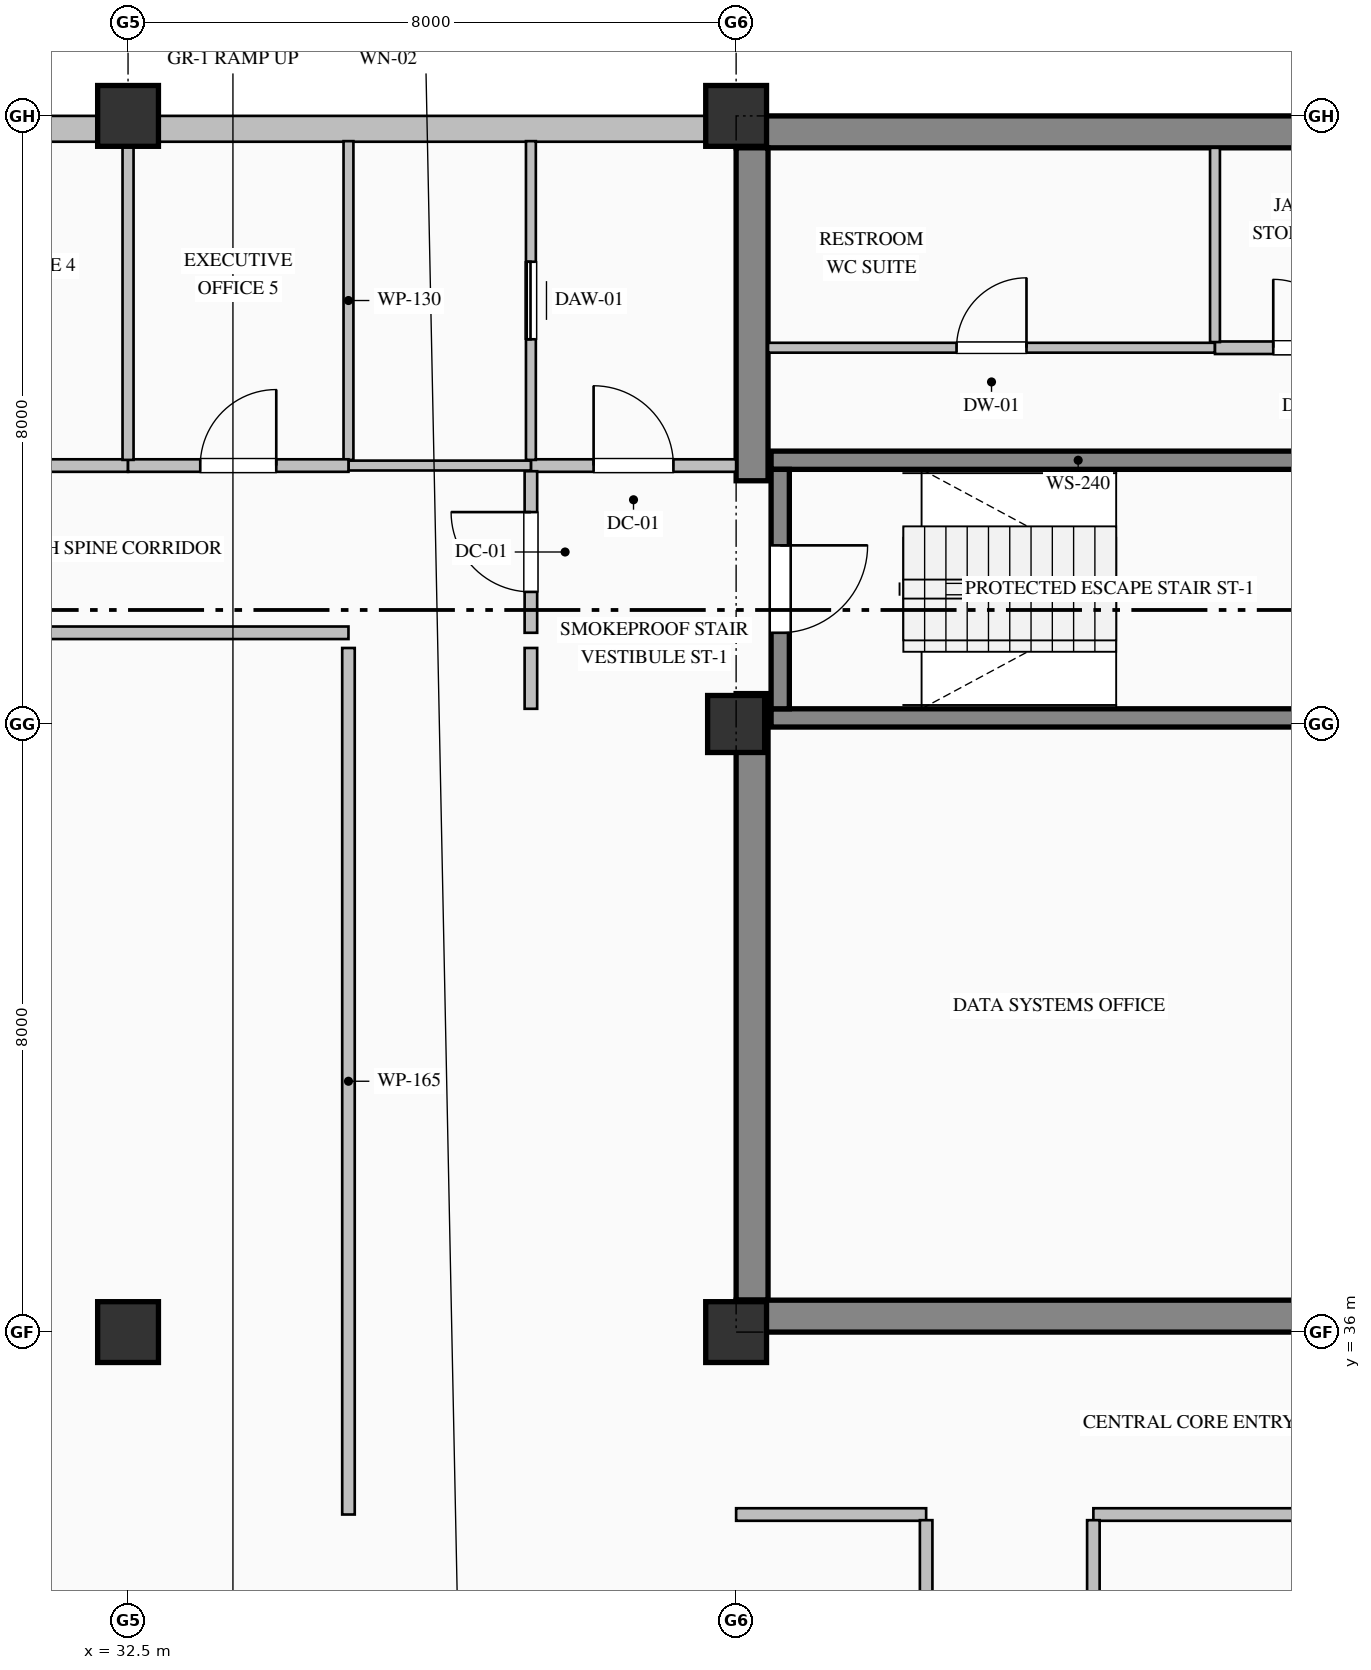
"""IFC4 building model, lengths in metres.
Left out: names, types, materials, properties, quantities, classifications, styles, units other than length and angle.
Written with IfcOpenShell. Run it as: python <this file> out.ifc"""

import sys

from ifc_helpers import new_model, si_unit, direction, frame, frame_2d, origin, origin_2d, place, context, subcontext, project, spatial, rectangle, hollow_rectangle, extrude, element, fill, save


model = new_model("IFC4")
c1 = context("Model", 3, precision=1e-05, world=origin(), true_north=direction((0.0, 1.0)))
c2 = subcontext(c1, "Body", "Model", "MODEL_VIEW")
j1 = project(units=[si_unit("LENGTHUNIT", "METRE"), si_unit("PLANEANGLEUNIT", "RADIAN")], contexts=[c1])
p1 = place(None, origin())
s1 = spatial("IfcSite", under=j1, at=p1, CompositionType="ELEMENT")
p2 = place(p1, origin())
s2 = spatial("IfcBuilding", under=s1, at=p2, CompositionType="ELEMENT")
p3 = place(p2, frame((0.0, 0.0, 291.2)))
s3 = spatial("IfcBuildingStorey", under=s2, at=p3, CompositionType="ELEMENT", Elevation=291.2)
p4 = place(p3, frame((40.5, 51.79, 0.0), z_axis=(0.0, 0.0, 1.0), x_axis=(1.0, 0.0, 0.0)))
e1 = element("IfcWall", 1, at=p4, inside=s3, PredefinedType="SHEAR", context=c2, shape_type="SweptSolid", body=[
    extrude(rectangle(XDim=23.5, YDim=0.42, at=frame_2d((11.75, 0.0))), origin(), (0.0, 0.0, 1.0), 3.785),
])
p5 = place(p3, frame((40.71, 36.42, 0.0), z_axis=(0.0, 0.0, 1.0), x_axis=(0.0, 1.0, 0.0)))
e2 = element("IfcWall", 2, at=p5, inside=s3, PredefinedType="SHEAR", context=c2, shape_type="SweptSolid", body=[
    extrude(rectangle(XDim=7.98, YDim=0.42, at=frame_2d((3.99, 0.0))), origin(), (0.0, 0.0, 1.0), 3.785),
])
p6 = place(p3, frame((40.71, 47.2, 0.0), z_axis=(0.0, 0.0, 1.0), x_axis=(0.0, 1.0, 0.0)))
e3 = element("IfcWall", 3, at=p6, inside=s3, PredefinedType="SHEAR", context=c2, shape_type="SweptSolid", body=[
    extrude(rectangle(XDim=4.38, YDim=0.42, at=frame_2d((2.19, 0.0))), origin(), (0.0, 0.0, 1.0), 3.785),
])
p7 = place(p3, frame((40.5, 36.21, 0.0), z_axis=(0.0, 0.0, 1.0), x_axis=(1.0, 0.0, 0.0)))
e4 = element("IfcWall", 4, at=p7, inside=s3, PredefinedType="SHEAR", context=c2, shape_type="SweptSolid", body=[
    extrude(rectangle(XDim=9.1, YDim=0.42, at=frame_2d((4.55, 0.0))), origin(), (0.0, 0.0, 1.0), 3.785),
])
for number, where, z_axis, x_axis in (
    (5, (32.5, 36.0, 0.0), (0.0, 0.0, 1.0), (1.0, 0.0, 0.0)),
    (6, (32.5, 52.0, 0.0), (0.0, 0.0, 1.0), (1.0, 0.0, 0.0)),
    (7, (40.5, 36.0, 0.0), (0.0, 0.0, 1.0), (1.0, 0.0, 0.0)),
):
    element("IfcColumn", number, at=place(p3, frame(where, z_axis=z_axis, x_axis=x_axis)), inside=s3, PredefinedType="COLUMN", context=c2, shape_type="SweptSolid", body=[
        extrude(hollow_rectangle(XDim=0.8, YDim=0.8, WallThickness=0.032, at=origin_2d()), origin(), (0.0, 0.0, 1.0), 4.0),
    ])
p8 = place(p3, frame((40.5, 44.0, 0.0), z_axis=(0.0, 0.0, 1.0), x_axis=(1.0, 0.0, 0.0)))
e8 = element("IfcColumn", 8, at=p8, inside=s3, PredefinedType="COLUMN", context=c2, shape_type="SweptSolid", body=[
    extrude(rectangle(XDim=0.75, YDim=0.75, at=origin_2d()), origin(), (0.0, 0.0, 1.0), 4.0),
])
p9 = place(p3, frame((40.5, 52.0, 0.0), z_axis=(0.0, 0.0, 1.0), x_axis=(1.0, 0.0, 0.0)))
e9 = element("IfcColumn", 9, at=p9, inside=s3, PredefinedType="COLUMN", context=c2, shape_type="SweptSolid", body=[
    extrude(hollow_rectangle(XDim=0.8, YDim=0.8, WallThickness=0.032, at=origin_2d()), origin(), (0.0, 0.0, 1.0), 4.0),
])
p10 = place(p3, frame((20.5, 51.83, 0.0), z_axis=(0.0, 0.0, 1.0), x_axis=(1.0, 0.0, 0.0)))
e10 = element("IfcWall", 10, at=p10, inside=s3, PredefinedType="SOLIDWALL", context=c2, shape_type="SweptSolid", body=[
    extrude(rectangle(XDim=20.02, YDim=0.34, at=frame_2d((10.01, 0.0))), origin(), (0.0, 0.0, 1.0), 3.335),
])
p11 = place(p10, frame((6.675, 0.0, 0.8)))
e11 = element("IfcOpeningElement", 11, at=p11, cuts=e10, PredefinedType="OPENING", context=c2, shape_type="SweptSolid", body=[
    extrude(rectangle(XDim=1.05, YDim=2.15, at=frame_2d((0.525, 1.075))), frame((0.0, 0.18, 0.0), z_axis=(0.0, -1.0, 0.0), x_axis=(1.0, 0.0, 0.0)), (0.0, 0.0, 1.0), 0.36),
])
for number, where, z_axis, x_axis in (
    (12, (40.96, 47.47, 0.0), (0.0, 0.0, 1.0), (1.0, 0.0, 0.0)),
    (13, (49.04, 44.08, 0.0), (0.0, 0.0, 1.0), (-1.0, 0.0, 0.0)),
):
    element("IfcWall", number, at=place(p3, frame(where, z_axis=z_axis, x_axis=x_axis)), inside=s3, PredefinedType="SOLIDWALL", context=c2, shape_type="SweptSolid", body=[
        extrude(rectangle(XDim=8.08, YDim=0.24, at=frame_2d((4.04, 0.0))), origin(), (0.0, 0.0, 1.0), 4.0),
    ])
p12 = place(p3, frame((41.08, 47.35, 0.0), z_axis=(0.0, 0.0, 1.0), x_axis=(0.0, -1.0, 0.0)))
e14 = element("IfcWall", 14, at=p12, inside=s3, PredefinedType="SOLIDWALL", context=c2, shape_type="SweptSolid", body=[
    extrude(rectangle(XDim=3.15, YDim=0.24, at=frame_2d((1.575, 0.0))), origin(), (0.0, 0.0, 1.0), 4.0),
])
p13 = place(p12, frame((1.0, 0.0, 0.0)))
e15 = element("IfcOpeningElement", 15, at=p13, cuts=e14, PredefinedType="OPENING", context=c2, shape_type="SweptSolid", body=[
    extrude(rectangle(XDim=1.15, YDim=2.2, at=frame_2d((0.575, 1.1))), frame((0.0, 0.13, 0.0), z_axis=(0.0, -1.0, 0.0), x_axis=(1.0, 0.0, 0.0)), (0.0, 0.0, 1.0), 0.26),
])
p14 = place(p3, frame((37.8, 47.4, 0.0), z_axis=(0.0, 0.0, 1.0), x_axis=(1.0, 0.0, 0.0)))
e16 = element("IfcWall", 16, at=p14, inside=s3, PredefinedType="PARTITIONING", context=c2, shape_type="SweptSolid", body=[
    extrude(rectangle(XDim=2.7, YDim=0.165, at=frame_2d((1.35, 0.0))), origin(), (0.0, 0.0, 1.0), 3.785),
])
p15 = place(p14, frame((0.825, 0.0, 0.0)))
e17 = element("IfcOpeningElement", 17, at=p15, cuts=e16, PredefinedType="OPENING", context=c2, shape_type="SweptSolid", body=[
    extrude(rectangle(XDim=1.05, YDim=2.15, at=frame_2d((0.525, 1.075))), frame((0.0, 0.093, 0.0), z_axis=(0.0, -1.0, 0.0), x_axis=(1.0, 0.0, 0.0)), (0.0, 0.0, 1.0), 0.185),
])
p16 = place(p3, frame((37.8, 45.2, 0.0), z_axis=(0.0, 0.0, 1.0), x_axis=(0.0, 1.0, 0.0)))
e18 = element("IfcWall", 18, at=p16, inside=s3, PredefinedType="PARTITIONING", context=c2, shape_type="SweptSolid", body=[
    extrude(rectangle(XDim=2.125, YDim=0.165, at=frame_2d((1.063, 0.0))), origin(), (0.0, 0.0, 1.0), 3.785),
])
p17 = place(p16, frame((0.538, 0.0, 0.0)))
e19 = element("IfcOpeningElement", 19, at=p17, cuts=e18, PredefinedType="OPENING", context=c2, shape_type="SweptSolid", body=[
    extrude(rectangle(XDim=1.05, YDim=2.15, at=frame_2d((0.525, 1.075))), frame((0.0, 0.093, 0.0), z_axis=(0.0, -1.0, 0.0), x_axis=(1.0, 0.0, 0.0)), (0.0, 0.0, 1.0), 0.185),
])
p18 = place(p3, frame((37.8, 44.2, 0.0), z_axis=(0.0, 0.0, 1.0), x_axis=(0.0, 1.0, 0.0)))
e20 = element("IfcWall", 20, at=p18, inside=s3, PredefinedType="PARTITIONING", context=c2, shape_type="SweptSolid", body=[
    extrude(rectangle(XDim=0.8, YDim=0.165, at=frame_2d((0.4, 0.0))), origin(), (0.0, 0.0, 1.0), 3.785),
])
p19 = place(p3, frame((37.8, 47.475, 0.0), z_axis=(0.0, 0.0, 1.0), x_axis=(0.0, 1.0, 0.0)))
e21 = element("IfcWall", 21, at=p19, inside=s3, PredefinedType="PARTITIONING", context=c2, shape_type="SweptSolid", body=[
    extrude(rectangle(XDim=4.193, YDim=0.13, at=frame_2d((2.097, 0.0))), origin(), (0.0, 0.0, 1.0), 3.785),
])
p20 = place(p19, frame((1.587, 0.0, 0.0)))
e22 = element("IfcOpeningElement", 22, at=p20, cuts=e21, PredefinedType="OPENING", context=c2, shape_type="SweptSolid", body=[
    extrude(rectangle(XDim=1.02, YDim=2.15, at=frame_2d((0.51, 1.075))), frame((0.0, 0.075, 0.0), z_axis=(0.0, -1.0, 0.0), x_axis=(1.0, 0.0, 0.0)), (0.0, 0.0, 1.0), 0.15),
])
p21 = place(p3, frame((37.8, 47.4, 0.0), z_axis=(0.0, 0.0, 1.0), x_axis=(-1.0, 0.0, 0.0)))
e23 = element("IfcWall", 23, at=p21, inside=s3, PredefinedType="PARTITIONING", context=c2, shape_type="SweptSolid", body=[
    extrude(rectangle(XDim=2.4, YDim=0.13, at=frame_2d((1.2, 0.0))), origin(), (0.0, 0.0, 1.0), 3.785),
])
p22 = place(p3, frame((35.4, 47.475, 0.0), z_axis=(0.0, 0.0, 1.0), x_axis=(0.0, 1.0, 0.0)))
e24 = element("IfcWall", 24, at=p22, inside=s3, PredefinedType="PARTITIONING", context=c2, shape_type="SweptSolid", body=[
    extrude(rectangle(XDim=4.193, YDim=0.13, at=frame_2d((2.097, 0.0))), origin(), (0.0, 0.0, 1.0), 3.785),
])
p23 = place(p3, frame((40.92, 48.95, 0.0), z_axis=(0.0, 0.0, 1.0), x_axis=(1.0, 0.0, 0.0)))
e25 = element("IfcWall", 25, at=p23, inside=s3, PredefinedType="PARTITIONING", context=c2, shape_type="SweptSolid", body=[
    extrude(rectangle(XDim=5.88, YDim=0.13, at=frame_2d((2.94, 0.0))), origin(), (0.0, 0.0, 1.0), 3.785),
])
p24 = place(p23, frame((2.48, 0.0, 0.0)))
e26 = element("IfcOpeningElement", 26, at=p24, cuts=e25, PredefinedType="OPENING", context=c2, shape_type="SweptSolid", body=[
    extrude(rectangle(XDim=0.92, YDim=2.15, at=frame_2d((0.46, 1.075))), frame((0.0, 0.075, 0.0), z_axis=(0.0, -1.0, 0.0), x_axis=(1.0, 0.0, 0.0)), (0.0, 0.0, 1.0), 0.15),
])
p25 = place(p3, frame((46.8, 48.95, 0.0), z_axis=(0.0, 0.0, 1.0), x_axis=(1.0, 0.0, 0.0)))
e27 = element("IfcWall", 27, at=p25, inside=s3, PredefinedType="PARTITIONING", context=c2, shape_type="SweptSolid", body=[
    extrude(rectangle(XDim=2.433, YDim=0.165, at=frame_2d((1.216, 0.0))), origin(), (0.0, 0.0, 1.0), 3.785),
])
p26 = place(p25, frame((0.767, 0.0, 0.0)))
e28 = element("IfcOpeningElement", 28, at=p26, cuts=e27, PredefinedType="OPENING", context=c2, shape_type="SweptSolid", body=[
    extrude(rectangle(XDim=0.9, YDim=2.15, at=frame_2d((0.45, 1.075))), frame((0.0, 0.093, 0.0), z_axis=(0.0, -1.0, 0.0), x_axis=(1.0, 0.0, 0.0)), (0.0, 0.0, 1.0), 0.185),
])
p27 = place(p3, frame((46.8, 51.58, 0.0), z_axis=(0.0, 0.0, 1.0), x_axis=(0.0, -1.0, 0.0)))
e29 = element("IfcWall", 29, at=p27, inside=s3, PredefinedType="PARTITIONING", context=c2, shape_type="SweptSolid", body=[
    extrude(rectangle(XDim=2.556, YDim=0.13, at=frame_2d((1.278, 0.0))), origin(), (0.0, 0.0, 1.0), 3.785),
])
p28 = place(p3, frame((35.4, 45.2, 0.0), z_axis=(0.0, 0.0, 1.0), x_axis=(-1.0, 0.0, 0.0)))
e30 = element("IfcWall", 30, at=p28, inside=s3, PredefinedType="PARTITIONING", context=c2, shape_type="SweptSolid", body=[
    extrude(rectangle(XDim=14.9, YDim=0.165, at=frame_2d((7.45, 0.0))), origin(), (0.0, 0.0, 1.0), 3.785),
])
p29 = place(p28, frame((6.95, 0.0, 0.0)))
e31 = element("IfcOpeningElement", 31, at=p29, cuts=e30, PredefinedType="OPENING", context=c2, shape_type="SweptSolid", body=[
    extrude(rectangle(XDim=1.0, YDim=2.15, at=frame_2d((0.5, 1.075))), frame((0.0, 0.093, 0.0), z_axis=(0.0, -1.0, 0.0), x_axis=(1.0, 0.0, 0.0)), (0.0, 0.0, 1.0), 0.185),
])
p30 = place(p3, frame((26.8, 47.4, 0.0), z_axis=(0.0, 0.0, 1.0), x_axis=(1.0, 0.0, 0.0)))
e32 = element("IfcWall", 32, at=p30, inside=s3, PredefinedType="PARTITIONING", context=c2, shape_type="SweptSolid", body=[
    extrude(rectangle(XDim=5.7, YDim=0.165, at=frame_2d((2.85, 0.0))), origin(), (0.0, 0.0, 1.0), 3.785),
])
p31 = place(p30, frame((2.35, 0.0, 0.0)))
e33 = element("IfcOpeningElement", 33, at=p31, cuts=e32, PredefinedType="OPENING", context=c2, shape_type="SweptSolid", body=[
    extrude(rectangle(XDim=1.0, YDim=2.15, at=frame_2d((0.5, 1.075))), frame((0.0, 0.093, 0.0), z_axis=(0.0, -1.0, 0.0), x_axis=(1.0, 0.0, 0.0)), (0.0, 0.0, 1.0), 0.185),
])
p32 = place(p3, frame((32.5, 47.4, 0.0), z_axis=(0.0, 0.0, 1.0), x_axis=(1.0, 0.0, 0.0)))
e34 = element("IfcWall", 34, at=p32, inside=s3, PredefinedType="PARTITIONING", context=c2, shape_type="SweptSolid", body=[
    extrude(rectangle(XDim=2.9, YDim=0.165, at=frame_2d((1.45, 0.0))), origin(), (0.0, 0.0, 1.0), 3.785),
])
p33 = place(p32, frame((0.95, 0.0, 0.0)))
e35 = element("IfcOpeningElement", 35, at=p33, cuts=e34, PredefinedType="OPENING", context=c2, shape_type="SweptSolid", body=[
    extrude(rectangle(XDim=1.0, YDim=2.15, at=frame_2d((0.5, 1.075))), frame((0.0, 0.093, 0.0), z_axis=(0.0, -1.0, 0.0), x_axis=(1.0, 0.0, 0.0)), (0.0, 0.0, 1.0), 0.185),
])
p34 = place(p3, frame((35.4, 33.6, 0.0), z_axis=(0.0, 0.0, 1.0), x_axis=(0.0, 1.0, 0.0)))
e36 = element("IfcWall", 36, at=p34, inside=s3, PredefinedType="PARTITIONING", context=c2, shape_type="SweptSolid", body=[
    extrude(rectangle(XDim=11.4, YDim=0.165, at=frame_2d((5.7, 0.0))), origin(), (0.0, 0.0, 1.0), 3.785),
])
p35 = place(p3, frame((56.5, 33.6, 0.0), z_axis=(0.0, 0.0, 1.0), x_axis=(-1.0, 0.0, 0.0)))
e37 = element("IfcWall", 37, at=p35, inside=s3, PredefinedType="PARTITIONING", context=c2, shape_type="SweptSolid", body=[
    extrude(rectangle(XDim=11.3, YDim=0.165, at=frame_2d((5.65, 0.0))), origin(), (0.0, 0.0, 1.0), 3.785),
])
p36 = place(p35, frame((5.15, 0.0, 0.0)))
e38 = element("IfcOpeningElement", 38, at=p36, cuts=e37, PredefinedType="OPENING", context=c2, shape_type="SweptSolid", body=[
    extrude(rectangle(XDim=1.0, YDim=2.15, at=frame_2d((0.5, 1.075))), frame((0.0, 0.093, 0.0), z_axis=(0.0, -1.0, 0.0), x_axis=(1.0, 0.0, 0.0)), (0.0, 0.0, 1.0), 0.185),
])
p37 = place(p3, frame((43.0, 33.6, 0.0), z_axis=(0.0, 0.0, 1.0), x_axis=(-1.0, 0.0, 0.0)))
e39 = element("IfcWall", 39, at=p37, inside=s3, PredefinedType="PARTITIONING", context=c2, shape_type="SweptSolid", body=[
    extrude(rectangle(XDim=2.5, YDim=0.165, at=frame_2d((1.25, 0.0))), origin(), (0.0, 0.0, 1.0), 3.785),
])
p38 = place(p3, frame((45.2, 33.525, 0.0), z_axis=(0.0, 0.0, 1.0), x_axis=(0.0, -1.0, 0.0)))
e40 = element("IfcWall", 40, at=p38, inside=s3, PredefinedType="PARTITIONING", context=c2, shape_type="SweptSolid", body=[
    extrude(rectangle(XDim=1.661, YDim=0.165, at=frame_2d((0.831, 0.0))), origin(), (0.0, 0.0, 1.0), 3.785),
])
p39 = place(p3, frame((43.0, 28.057, 0.0), z_axis=(0.0, 0.0, 1.0), x_axis=(0.0, 1.0, 0.0)))
e41 = element("IfcWall", 41, at=p39, inside=s3, PredefinedType="PARTITIONING", context=c2, shape_type="SweptSolid", body=[
    extrude(rectangle(XDim=5.469, YDim=0.165, at=frame_2d((2.734, 0.0))), origin(), (0.0, 0.0, 1.0), 3.785),
])
p40 = place(p39, frame((2.234, 0.0, 0.0)))
e42 = element("IfcOpeningElement", 42, at=p40, cuts=e41, PredefinedType="OPENING", context=c2, shape_type="SweptSolid", body=[
    extrude(rectangle(XDim=1.0, YDim=2.15, at=frame_2d((0.5, 1.075))), frame((0.0, 0.093, 0.0), z_axis=(0.0, -1.0, 0.0), x_axis=(1.0, 0.0, 0.0)), (0.0, 0.0, 1.0), 0.185),
])
p41 = place(p3, frame((32.5, 51.668, 0.0), z_axis=(0.0, 0.0, 1.0), x_axis=(0.0, -1.0, 0.0)))
e43 = element("IfcWall", 43, at=p41, inside=s3, PredefinedType="PARTITIONING", context=c2, shape_type="SweptSolid", body=[
    extrude(rectangle(XDim=4.193, YDim=0.145, at=frame_2d((2.097, 0.0))), origin(), (0.0, 0.0, 1.0), 3.785),
])
p42 = place(p13, origin())
e44 = element("IfcDoor", 44, at=p42, inside=s3, OperationType="SINGLE_SWING_LEFT", PredefinedType="DOOR", context=c2, shape_type="SweptSolid", body=[
    extrude(rectangle(XDim=1.15, YDim=2.2, at=frame_2d((0.575, 1.1))), frame((0.0, 0.025, 0.0), z_axis=(0.0, -1.0, 0.0), x_axis=(1.0, 0.0, 0.0)), (0.0, 0.0, 1.0), 0.05),
])
fill(e15, e44)
p43 = place(p15, origin())
e45 = element("IfcDoor", 45, at=p43, inside=s3, OperationType="SINGLE_SWING_LEFT", PredefinedType="DOOR", context=c2, shape_type="SweptSolid", body=[
    extrude(rectangle(XDim=1.05, YDim=2.15, at=frame_2d((0.525, 1.075))), frame((0.0, 0.025, 0.0), z_axis=(0.0, -1.0, 0.0), x_axis=(1.0, 0.0, 0.0)), (0.0, 0.0, 1.0), 0.05),
])
fill(e17, e45)
p44 = place(p17, origin())
e46 = element("IfcDoor", 46, at=p44, inside=s3, OperationType="SINGLE_SWING_RIGHT", PredefinedType="DOOR", context=c2, shape_type="SweptSolid", body=[
    extrude(rectangle(XDim=1.05, YDim=2.15, at=frame_2d((0.525, 1.075))), frame((0.0, 0.025, 0.0), z_axis=(0.0, -1.0, 0.0), x_axis=(1.0, 0.0, 0.0)), (0.0, 0.0, 1.0), 0.05),
])
fill(e19, e46)
p45 = place(p20, origin())
e47 = element("IfcDoor", 47, at=p45, inside=s3, OperationType="SLIDING_TO_LEFT", PredefinedType="DOOR", context=c2, shape_type="SweptSolid", body=[
    extrude(rectangle(XDim=1.02, YDim=2.15, at=frame_2d((0.51, 1.075))), frame((0.0, 0.025, 0.0), z_axis=(0.0, -1.0, 0.0), x_axis=(1.0, 0.0, 0.0)), (0.0, 0.0, 1.0), 0.05),
])
fill(e22, e47)
p46 = place(p24, origin())
e48 = element("IfcDoor", 48, at=p46, inside=s3, OperationType="SINGLE_SWING_RIGHT", PredefinedType="DOOR", context=c2, shape_type="SweptSolid", body=[
    extrude(rectangle(XDim=0.92, YDim=2.15, at=frame_2d((0.46, 1.075))), frame((0.0, 0.025, 0.0), z_axis=(0.0, -1.0, 0.0), x_axis=(1.0, 0.0, 0.0)), (0.0, 0.0, 1.0), 0.05),
])
fill(e26, e48)
p47 = place(p26, origin())
e49 = element("IfcDoor", 49, at=p47, inside=s3, OperationType="SINGLE_SWING_LEFT", PredefinedType="DOOR", context=c2, shape_type="SweptSolid", body=[
    extrude(rectangle(XDim=0.9, YDim=2.15, at=frame_2d((0.45, 1.075))), frame((0.0, 0.025, 0.0), z_axis=(0.0, -1.0, 0.0), x_axis=(1.0, 0.0, 0.0)), (0.0, 0.0, 1.0), 0.05),
])
fill(e28, e49)
p48 = place(p33, origin())
e50 = element("IfcDoor", 50, at=p48, inside=s3, OperationType="SINGLE_SWING_RIGHT", PredefinedType="DOOR", context=c2, shape_type="SweptSolid", body=[
    extrude(rectangle(XDim=1.0, YDim=2.15, at=frame_2d((0.5, 1.075))), frame((0.0, 0.025, 0.0), z_axis=(0.0, -1.0, 0.0), x_axis=(1.0, 0.0, 0.0)), (0.0, 0.0, 1.0), 0.05),
])
fill(e35, e50)
save(model, sys.argv[1])
